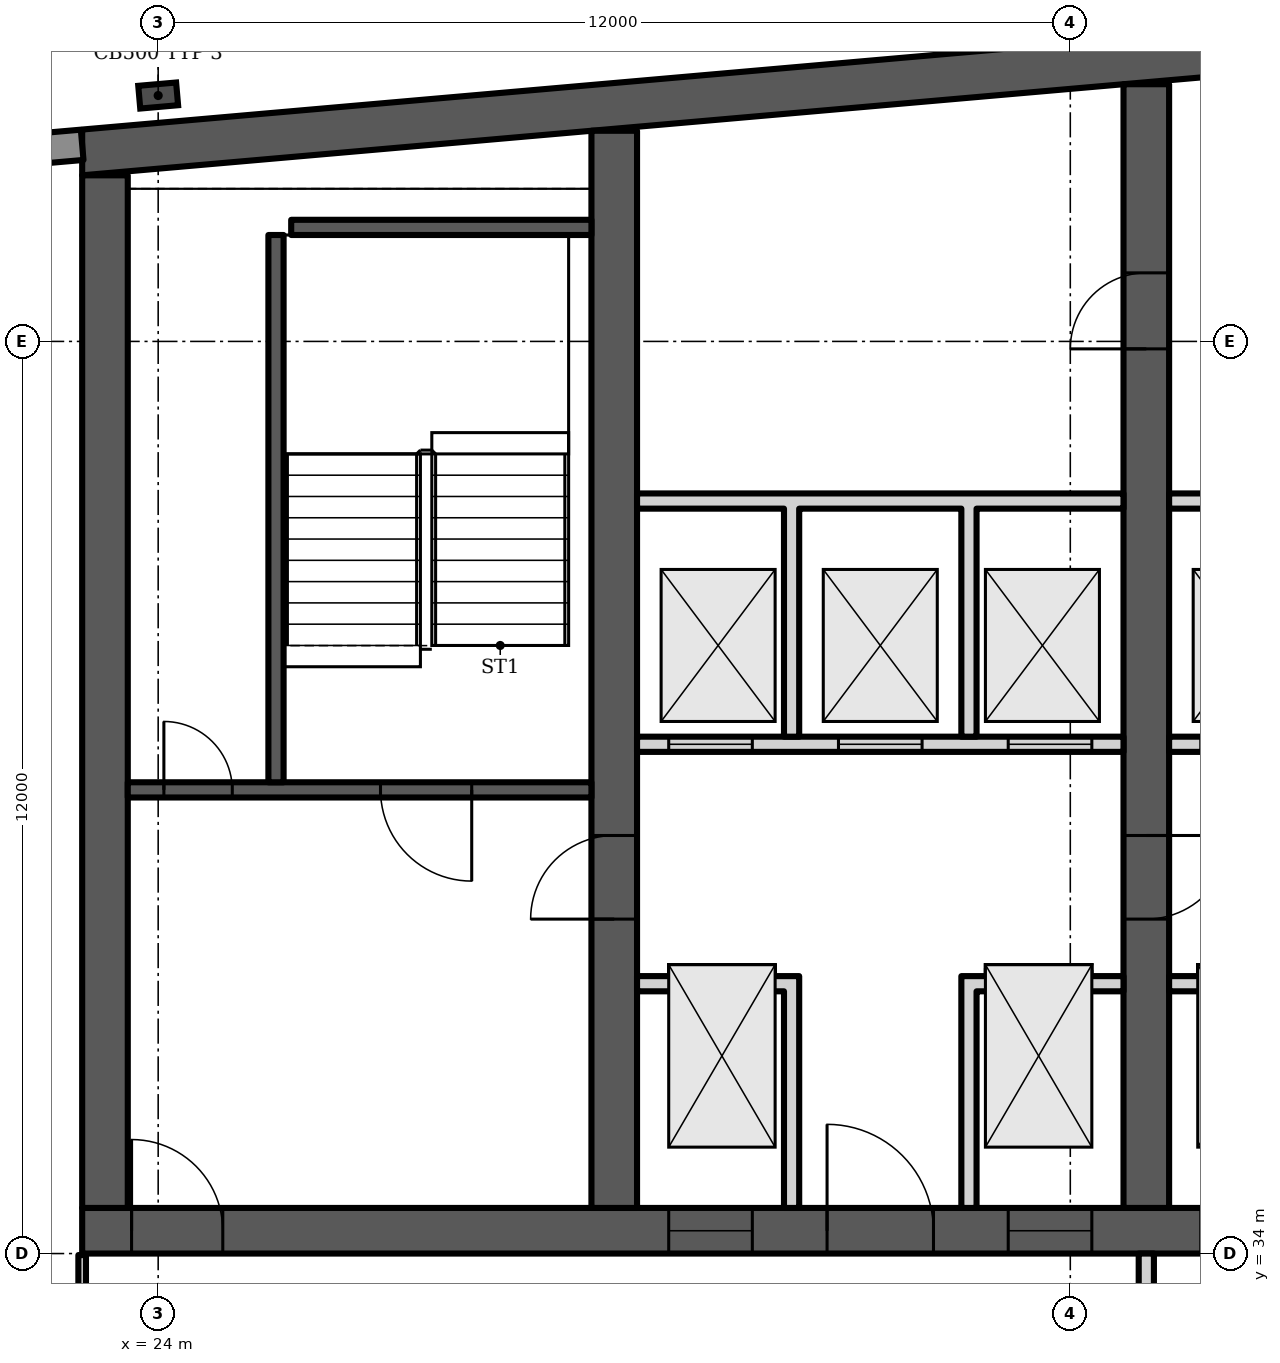
"""IFC4 building model, lengths in metres.
Left out: names, types, materials, properties, quantities, classifications, styles, units other than length and angle.
Written with IfcOpenShell. Run it as: python <this file> out.ifc"""

import sys

from ifc_helpers import new_model, si_unit, direction, frame, frame_2d, origin, origin_2d, place, context, subcontext, project, spatial, polyline, rectangle, i_section, outline, extrude, element, fill, save


model = new_model("IFC4")
c1 = context("Model", 3, precision=1e-05, world=origin(), true_north=direction((0.0, 1.0)))
c2 = subcontext(c1, "Body", "Model", "MODEL_VIEW")
j1 = project(units=[si_unit("LENGTHUNIT", "METRE"), si_unit("PLANEANGLEUNIT", "RADIAN")], contexts=[c1])
p1 = place(None, origin())
s1 = spatial("IfcSite", under=j1, at=p1, CompositionType="ELEMENT")
p2 = place(p1, origin())
s2 = spatial("IfcBuilding", under=s1, at=p2, CompositionType="ELEMENT")
p3 = place(p2, frame((0.0, 0.0, 232.3)))
s3 = spatial("IfcBuildingStorey", under=s2, at=p3, CompositionType="ELEMENT", Elevation=232.3)
p4 = place(p3, frame((0.0, 0.0, -0.0)))
e1 = element("IfcWall", 1, at=p4, inside=s3, PredefinedType="SHEAR", context=c2, shape_type="SweptSolid", body=[
    extrude(outline(polyline([(23.0, 48.185), (40.5, 49.716), (58.0, 48.185), (58.0, 48.787), (40.5, 50.318), (23.0, 48.787), (23.0, 48.185)])), origin(), (0.0, 0.0, 1.0), 3.6),
])
p5 = place(p3, frame((23.0, 34.3, 0.0), z_axis=(0.0, 0.0, 1.0), x_axis=(1.0, 0.0, 0.0)))
e2 = element("IfcWall", 2, at=p5, inside=s3, PredefinedType="SHEAR", context=c2, shape_type="SweptSolid", body=[
    extrude(rectangle(XDim=35.0, YDim=0.6, at=frame_2d((17.5, 0.0))), origin(), (0.0, 0.0, 1.0), 3.6),
])
p6 = place(p5, frame((0.65, 0.0, 0.0)))
e3 = element("IfcOpeningElement", 3, at=p6, cuts=e2, PredefinedType="OPENING", context=c2, shape_type="SweptSolid", body=[
    extrude(rectangle(XDim=1.2, YDim=2.1, at=frame_2d((0.6, 1.05))), frame((0.0, 0.31, 0.0), z_axis=(0.0, -1.0, 0.0), x_axis=(1.0, 0.0, 0.0)), (0.0, 0.0, 1.0), 0.62),
])
p7 = place(p5, frame((7.717, 0.0, 0.0)))
e4 = element("IfcOpeningElement", 4, at=p7, cuts=e2, PredefinedType="OPENING", context=c2, shape_type="SweptSolid", body=[
    extrude(rectangle(XDim=1.1, YDim=2.1, at=frame_2d((0.55, 1.05))), frame((0.0, 0.31, 0.0), z_axis=(0.0, -1.0, 0.0), x_axis=(1.0, 0.0, 0.0)), (0.0, 0.0, 1.0), 0.62),
])
p8 = place(p5, frame((12.183, 0.0, 0.0)))
e5 = element("IfcOpeningElement", 5, at=p8, cuts=e2, PredefinedType="OPENING", context=c2, shape_type="SweptSolid", body=[
    extrude(rectangle(XDim=1.1, YDim=2.1, at=frame_2d((0.55, 1.05))), frame((0.0, 0.31, 0.0), z_axis=(0.0, -1.0, 0.0), x_axis=(1.0, 0.0, 0.0)), (0.0, 0.0, 1.0), 0.62),
])
p9 = place(p5, frame((9.8, 0.0, 0.0)))
e6 = element("IfcOpeningElement", 6, at=p9, cuts=e2, PredefinedType="OPENING", context=c2, shape_type="SweptSolid", body=[
    extrude(rectangle(XDim=1.4, YDim=2.1, at=frame_2d((0.7, 1.05))), frame((0.0, 0.31, 0.0), z_axis=(0.0, -1.0, 0.0), x_axis=(1.0, 0.0, 0.0)), (0.0, 0.0, 1.0), 0.62),
])
p10 = place(p5, frame((14.717, 0.0, 0.0)))
e7 = element("IfcOpeningElement", 7, at=p10, cuts=e2, PredefinedType="OPENING", context=c2, shape_type="SweptSolid", body=[
    extrude(rectangle(XDim=1.1, YDim=2.1, at=frame_2d((0.55, 1.05))), frame((0.0, 0.31, 0.0), z_axis=(0.0, -1.0, 0.0), x_axis=(1.0, 0.0, 0.0)), (0.0, 0.0, 1.0), 0.62),
])
p11 = place(p5, frame((16.95, 0.0, 0.0)))
e8 = element("IfcOpeningElement", 8, at=p11, cuts=e2, PredefinedType="OPENING", context=c2, shape_type="SweptSolid", body=[
    extrude(rectangle(XDim=1.1, YDim=2.1, at=frame_2d((0.55, 1.05))), frame((0.0, 0.31, 0.0), z_axis=(0.0, -1.0, 0.0), x_axis=(1.0, 0.0, 0.0)), (0.0, 0.0, 1.0), 0.62),
])
p12 = place(p5, frame((19.183, 0.0, 0.0)))
e9 = element("IfcOpeningElement", 9, at=p12, cuts=e2, PredefinedType="OPENING", context=c2, shape_type="SweptSolid", body=[
    extrude(rectangle(XDim=1.1, YDim=2.1, at=frame_2d((0.55, 1.05))), frame((0.0, 0.31, 0.0), z_axis=(0.0, -1.0, 0.0), x_axis=(1.0, 0.0, 0.0)), (0.0, 0.0, 1.0), 0.62),
])
p13 = place(p5, frame((26.15, 0.0, 0.0)))
e10 = element("IfcOpeningElement", 10, at=p13, cuts=e2, PredefinedType="OPENING", context=c2, shape_type="SweptSolid", body=[
    extrude(rectangle(XDim=1.2, YDim=2.1, at=frame_2d((0.6, 1.05))), frame((0.0, 0.31, 0.0), z_axis=(0.0, -1.0, 0.0), x_axis=(1.0, 0.0, 0.0)), (0.0, 0.0, 1.0), 0.62),
])
p14 = place(p5, frame((28.767, 0.0, 0.0)))
e11 = element("IfcOpeningElement", 11, at=p14, cuts=e2, PredefinedType="OPENING", context=c2, shape_type="SweptSolid", body=[
    extrude(rectangle(XDim=1.0, YDim=2.1, at=frame_2d((0.5, 1.05))), frame((0.0, 0.31, 0.0), z_axis=(0.0, -1.0, 0.0), x_axis=(1.0, 0.0, 0.0)), (0.0, 0.0, 1.0), 0.62),
])
p15 = place(p5, frame((33.083, 0.0, 0.0)))
e12 = element("IfcOpeningElement", 12, at=p15, cuts=e2, PredefinedType="OPENING", context=c2, shape_type="SweptSolid", body=[
    extrude(rectangle(XDim=1.0, YDim=2.1, at=frame_2d((0.5, 1.05))), frame((0.0, 0.31, 0.0), z_axis=(0.0, -1.0, 0.0), x_axis=(1.0, 0.0, 0.0)), (0.0, 0.0, 1.0), 0.62),
])
p16 = place(p5, frame((30.8, 0.0, 0.0)))
e13 = element("IfcOpeningElement", 13, at=p16, cuts=e2, PredefinedType="OPENING", context=c2, shape_type="SweptSolid", body=[
    extrude(rectangle(XDim=1.4, YDim=2.1, at=frame_2d((0.7, 1.05))), frame((0.0, 0.31, 0.0), z_axis=(0.0, -1.0, 0.0), x_axis=(1.0, 0.0, 0.0)), (0.0, 0.0, 1.0), 0.62),
])
p17 = place(p3, frame((23.3, 34.6, 0.0), z_axis=(0.0, 0.0, 1.0), x_axis=(0.0, 1.0, 0.0)))
e14 = element("IfcWall", 14, at=p17, inside=s3, PredefinedType="SHEAR", context=c2, shape_type="SweptSolid", body=[
    extrude(rectangle(XDim=13.585, YDim=0.6, at=frame_2d((6.792, 0.0))), origin(), (0.0, 0.0, 1.0), 3.6),
])
p18 = place(p3, frame((30.0, 34.6, 0.0), z_axis=(0.0, 0.0, 1.0), x_axis=(0.0, 1.0, 0.0)))
e15 = element("IfcWall", 15, at=p18, inside=s3, PredefinedType="SHEAR", context=c2, shape_type="SweptSolid", body=[
    extrude(rectangle(XDim=14.171, YDim=0.6, at=frame_2d((7.085, 0.0))), origin(), (0.0, 0.0, 1.0), 3.6),
])
p19 = place(p18, frame((3.8, 0.0, 0.0)))
e16 = element("IfcOpeningElement", 16, at=p19, cuts=e15, PredefinedType="OPENING", context=c2, shape_type="SweptSolid", body=[
    extrude(rectangle(XDim=1.1, YDim=2.1, at=frame_2d((0.55, 1.05))), frame((0.0, 0.31, 0.0), z_axis=(0.0, -1.0, 0.0), x_axis=(1.0, 0.0, 0.0)), (0.0, 0.0, 1.0), 0.62),
])
p20 = place(p3, frame((37.0, 34.6, 0.0), z_axis=(0.0, 0.0, 1.0), x_axis=(0.0, 1.0, 0.0)))
e17 = element("IfcWall", 17, at=p20, inside=s3, PredefinedType="SHEAR", context=c2, shape_type="SweptSolid", body=[
    extrude(rectangle(XDim=14.784, YDim=0.6, at=frame_2d((7.392, 0.0))), origin(), (0.0, 0.0, 1.0), 3.6),
])
p21 = place(p20, frame((11.302, 0.0, 0.0)))
e18 = element("IfcOpeningElement", 18, at=p21, cuts=e17, PredefinedType="OPENING", context=c2, shape_type="SweptSolid", body=[
    extrude(rectangle(XDim=1.0, YDim=2.1, at=frame_2d((0.5, 1.05))), frame((0.0, 0.31, 0.0), z_axis=(0.0, -1.0, 0.0), x_axis=(1.0, 0.0, 0.0)), (0.0, 0.0, 1.0), 0.62),
])
p22 = place(p20, frame((3.8, 0.0, 0.0)))
e19 = element("IfcOpeningElement", 19, at=p22, cuts=e17, PredefinedType="OPENING", context=c2, shape_type="SweptSolid", body=[
    extrude(rectangle(XDim=1.1, YDim=2.1, at=frame_2d((0.55, 1.05))), frame((0.0, 0.31, 0.0), z_axis=(0.0, -1.0, 0.0), x_axis=(1.0, 0.0, 0.0)), (0.0, 0.0, 1.0), 0.62),
])
p23 = place(p3, frame((24.0, 49.235, 0.0), z_axis=(0.0, 0.0, 1.0), x_axis=(-0.087156, 0.996197, 0.0)))
e20 = element("IfcColumn", 20, at=p23, inside=s3, PredefinedType="COLUMN", context=c2, shape_type="SweptSolid", body=[
    extrude(i_section(OverallWidth=0.3, OverallDepth=0.5, WebThickness=0.014, FlangeThickness=0.028, FilletRadius=0.027, at=origin_2d()), origin(), (0.0, 0.0, 1.0), 3.6),
])
p24 = place(p3, frame((23.0, 48.587, 0.0), z_axis=(0.0, 0.0, 1.0), x_axis=(-0.996194, -0.087168, 0.0)))
e21 = element("IfcWall", 21, at=p24, inside=s3, PredefinedType="SOLIDWALL", context=c2, shape_type="SweptSolid", body=[
    extrude(rectangle(XDim=2.994, YDim=0.4, at=frame_2d((1.497, 0.0))), origin(), (0.0, 0.0, 1.0), 3.2),
])
p25 = place(p3, frame((23.6, 40.1, 0.0), z_axis=(0.0, 0.0, 1.0), x_axis=(1.0, 0.0, 0.0)))
e22 = element("IfcWall", 22, at=p25, inside=s3, PredefinedType="SHEAR", context=c2, shape_type="SweptSolid", body=[
    extrude(rectangle(XDim=6.1, YDim=0.2, at=frame_2d((3.05, 0.0))), origin(), (0.0, 0.0, 1.0), 3.2),
])
p26 = place(p25, frame((3.325, 0.0, 0.0)))
e23 = element("IfcOpeningElement", 23, at=p26, cuts=e22, PredefinedType="OPENING", context=c2, shape_type="SweptSolid", body=[
    extrude(rectangle(XDim=1.2, YDim=2.1, at=frame_2d((0.6, 1.05))), frame((0.0, 0.11, 0.0), z_axis=(0.0, -1.0, 0.0), x_axis=(1.0, 0.0, 0.0)), (0.0, 0.0, 1.0), 0.22),
])
p27 = place(p25, frame((0.475, 0.0, 0.0)))
e24 = element("IfcOpeningElement", 24, at=p27, cuts=e22, PredefinedType="OPENING", context=c2, shape_type="SweptSolid", body=[
    extrude(rectangle(XDim=0.9, YDim=2.1, at=frame_2d((0.45, 1.05))), frame((0.0, 0.11, 0.0), z_axis=(0.0, -1.0, 0.0), x_axis=(1.0, 0.0, 0.0)), (0.0, 0.0, 1.0), 0.22),
])
p28 = place(p3, frame((25.55, 40.2, 0.0), z_axis=(0.0, 0.0, 1.0), x_axis=(0.0, 1.0, 0.0)))
e25 = element("IfcWall", 25, at=p28, inside=s3, PredefinedType="SHEAR", context=c2, shape_type="SweptSolid", body=[
    extrude(rectangle(XDim=7.2, YDim=0.2, at=frame_2d((3.6, 0.0))), origin(), (0.0, 0.0, 1.0), 3.2),
])
p29 = place(p3, frame((25.75, 47.5, 0.0), z_axis=(0.0, 0.0, 1.0), x_axis=(1.0, 0.0, 0.0)))
e26 = element("IfcWall", 26, at=p29, inside=s3, PredefinedType="SHEAR", context=c2, shape_type="SweptSolid", body=[
    extrude(rectangle(XDim=3.95, YDim=0.2, at=frame_2d((1.975, 0.0))), origin(), (0.0, 0.0, 1.0), 3.2),
])
p30 = place(p3, frame((30.3, 40.7, 0.0), z_axis=(0.0, 0.0, 1.0), x_axis=(1.0, 0.0, 0.0)))
e27 = element("IfcWall", 27, at=p30, inside=s3, PredefinedType="PARTITIONING", context=c2, shape_type="SweptSolid", body=[
    extrude(rectangle(XDim=6.4, YDim=0.2, at=frame_2d((3.2, 0.0))), origin(), (0.0, 0.0, 1.0), 3.2),
])
p31 = place(p30, frame((0.417, 0.0, 0.0)))
e28 = element("IfcOpeningElement", 28, at=p31, cuts=e27, PredefinedType="OPENING", context=c2, shape_type="SweptSolid", body=[
    extrude(rectangle(XDim=1.1, YDim=2.1, at=frame_2d((0.55, 1.05))), frame((0.0, 0.11, 0.0), z_axis=(0.0, -1.0, 0.0), x_axis=(1.0, 0.0, 0.0)), (0.0, 0.0, 1.0), 0.22),
])
p32 = place(p30, frame((2.65, 0.0, 0.0)))
e29 = element("IfcOpeningElement", 29, at=p32, cuts=e27, PredefinedType="OPENING", context=c2, shape_type="SweptSolid", body=[
    extrude(rectangle(XDim=1.1, YDim=2.1, at=frame_2d((0.55, 1.05))), frame((0.0, 0.11, 0.0), z_axis=(0.0, -1.0, 0.0), x_axis=(1.0, 0.0, 0.0)), (0.0, 0.0, 1.0), 0.22),
])
p33 = place(p30, frame((4.883, 0.0, 0.0)))
e30 = element("IfcOpeningElement", 30, at=p33, cuts=e27, PredefinedType="OPENING", context=c2, shape_type="SweptSolid", body=[
    extrude(rectangle(XDim=1.1, YDim=2.1, at=frame_2d((0.55, 1.05))), frame((0.0, 0.11, 0.0), z_axis=(0.0, -1.0, 0.0), x_axis=(1.0, 0.0, 0.0)), (0.0, 0.0, 1.0), 0.22),
])
p34 = place(p3, frame((0.0, 0.0, -0.0)))
e31 = element("IfcWall", 31, at=p34, inside=s3, PredefinedType="PARTITIONING", context=c2, shape_type="SweptSolid", body=[
    extrude(outline(polyline([(32.233, 37.45), (30.3, 37.45), (30.3, 37.65), (32.233, 37.65), (32.433, 37.65), (32.433, 34.6), (32.233, 34.6), (32.233, 37.45)])), origin(), (0.0, 0.0, 1.0), 3.2),
])
p35 = place(p3, frame((0.0, 0.0, -0.0)))
e32 = element("IfcWall", 32, at=p35, inside=s3, PredefinedType="PARTITIONING", context=c2, shape_type="SweptSolid", body=[
    extrude(outline(polyline([(34.567, 37.65), (34.767, 37.65), (36.7, 37.65), (36.7, 37.45), (34.767, 37.45), (34.767, 34.6), (34.567, 34.6), (34.567, 37.65)])), origin(), (0.0, 0.0, 1.0), 3.2),
])
p36 = place(p3, frame((0.0, 0.0, -0.0)))
e33 = element("IfcWall", 33, at=p36, inside=s3, PredefinedType="PARTITIONING", context=c2, shape_type="SweptSolid", body=[
    extrude(outline(polyline([(32.433, 40.8), (32.233, 40.8), (32.233, 43.8), (30.3, 43.8), (30.3, 44.0), (36.7, 44.0), (36.7, 43.8), (34.767, 43.8), (34.767, 40.8), (34.567, 40.8), (34.567, 43.8), (32.433, 43.8), (32.433, 40.8)])), origin(), (0.0, 0.0, 1.0), 3.2),
])
p37 = place(p3, frame((37.3, 40.7, 0.0), z_axis=(0.0, 0.0, 1.0), x_axis=(1.0, 0.0, 0.0)))
e34 = element("IfcWall", 34, at=p37, inside=s3, PredefinedType="PARTITIONING", context=c2, shape_type="SweptSolid", body=[
    extrude(rectangle(XDim=6.4, YDim=0.2, at=frame_2d((3.2, 0.0))), origin(), (0.0, 0.0, 1.0), 3.2),
])
p38 = place(p37, frame((0.417, 0.0, 0.0)))
e35 = element("IfcOpeningElement", 35, at=p38, cuts=e34, PredefinedType="OPENING", context=c2, shape_type="SweptSolid", body=[
    extrude(rectangle(XDim=1.1, YDim=2.1, at=frame_2d((0.55, 1.05))), frame((0.0, 0.11, 0.0), z_axis=(0.0, -1.0, 0.0), x_axis=(1.0, 0.0, 0.0)), (0.0, 0.0, 1.0), 0.22),
])
p39 = place(p37, frame((2.65, 0.0, 0.0)))
e36 = element("IfcOpeningElement", 36, at=p39, cuts=e34, PredefinedType="OPENING", context=c2, shape_type="SweptSolid", body=[
    extrude(rectangle(XDim=1.1, YDim=2.1, at=frame_2d((0.55, 1.05))), frame((0.0, 0.11, 0.0), z_axis=(0.0, -1.0, 0.0), x_axis=(1.0, 0.0, 0.0)), (0.0, 0.0, 1.0), 0.22),
])
p40 = place(p37, frame((4.883, 0.0, 0.0)))
e37 = element("IfcOpeningElement", 37, at=p40, cuts=e34, PredefinedType="OPENING", context=c2, shape_type="SweptSolid", body=[
    extrude(rectangle(XDim=1.1, YDim=2.1, at=frame_2d((0.55, 1.05))), frame((0.0, 0.11, 0.0), z_axis=(0.0, -1.0, 0.0), x_axis=(1.0, 0.0, 0.0)), (0.0, 0.0, 1.0), 0.22),
])
p41 = place(p3, frame((0.0, 0.0, -0.0)))
e38 = element("IfcWall", 38, at=p41, inside=s3, PredefinedType="PARTITIONING", context=c2, shape_type="SweptSolid", body=[
    extrude(outline(polyline([(41.567, 37.1), (39.433, 37.1), (39.433, 34.6), (39.233, 34.6), (39.233, 37.45), (37.3, 37.45), (37.3, 37.65), (39.233, 37.65), (39.433, 37.65), (39.433, 37.3), (41.567, 37.3), (41.567, 37.35), (41.767, 37.35), (43.7, 37.35), (43.7, 37.15), (41.767, 37.15), (41.767, 34.6), (41.567, 34.6), (41.567, 37.1)])), origin(), (0.0, 0.0, 1.0), 3.2),
])
p42 = place(p3, frame((0.0, 0.0, -0.0)))
e39 = element("IfcWall", 39, at=p42, inside=s3, PredefinedType="PARTITIONING", context=c2, shape_type="SweptSolid", body=[
    extrude(outline(polyline([(39.433, 40.8), (39.233, 40.8), (39.233, 43.8), (37.3, 43.8), (37.3, 44.0), (43.7, 44.0), (43.7, 43.8), (41.767, 43.8), (41.767, 40.8), (41.567, 40.8), (41.567, 43.8), (39.433, 43.8), (39.433, 40.8)])), origin(), (0.0, 0.0, 1.0), 3.2),
])
p43 = place(p3, frame((37.0, 30.5, 0.0), z_axis=(0.0, 0.0, 1.0), x_axis=(0.0, 1.0, 0.0)))
e40 = element("IfcWall", 40, at=p43, inside=s3, PredefinedType="PARTITIONING", context=c2, shape_type="SweptSolid", body=[
    extrude(rectangle(XDim=3.5, YDim=0.2, at=frame_2d((1.75, 0.0))), origin(), (0.0, 0.0, 1.0), 3.2),
])
p44 = place(p43, frame((1.2, 0.0, 0.0)))
e41 = element("IfcOpeningElement", 41, at=p44, cuts=e40, PredefinedType="OPENING", context=c2, shape_type="SweptSolid", body=[
    extrude(rectangle(XDim=1.1, YDim=2.1, at=frame_2d((0.55, 1.05))), frame((0.0, 0.11, 0.0), z_axis=(0.0, -1.0, 0.0), x_axis=(1.0, 0.0, 0.0)), (0.0, 0.0, 1.0), 0.22),
])
p45 = place(p3, frame((23.0, 24.275, 0.0), z_axis=(0.0, 0.0, 1.0), x_axis=(0.0, 1.0, 0.0)))
e42 = element("IfcWall", 42, at=p45, inside=s3, PredefinedType="PARTITIONING", context=c2, shape_type="SweptSolid", body=[
    extrude(rectangle(XDim=9.705, YDim=0.1, at=frame_2d((4.853, 0.0))), origin(), (0.0, 0.0, 1.0), 3.2),
])
p46 = place(p45, frame((7.905, 0.0, 0.0)))
e43 = element("IfcOpeningElement", 43, at=p46, cuts=e42, PredefinedType="OPENING", context=c2, shape_type="SweptSolid", body=[
    extrude(rectangle(XDim=1.0, YDim=2.1, at=frame_2d((0.5, 1.05))), frame((0.0, 0.06, 0.0), z_axis=(0.0, -1.0, 0.0), x_axis=(1.0, 0.0, 0.0)), (0.0, 0.0, 1.0), 0.12),
])
p47 = place(p26, origin())
e44 = element("IfcDoor", 44, at=p47, inside=s3, OperationType="SINGLE_SWING_RIGHT", PredefinedType="DOOR", context=c2, shape_type="SweptSolid", body=[
    extrude(rectangle(XDim=1.2, YDim=2.1, at=frame_2d((0.6, 1.05))), frame((0.0, 0.025, 0.0), z_axis=(0.0, -1.0, 0.0), x_axis=(1.0, 0.0, 0.0)), (0.0, 0.0, 1.0), 0.05),
])
fill(e23, e44)
p48 = place(p27, origin())
e45 = element("IfcDoor", 45, at=p48, inside=s3, OperationType="SINGLE_SWING_LEFT", PredefinedType="DOOR", context=c2, shape_type="SweptSolid", body=[
    extrude(rectangle(XDim=0.9, YDim=2.1, at=frame_2d((0.45, 1.05))), frame((0.0, 0.025, 0.0), z_axis=(0.0, -1.0, 0.0), x_axis=(1.0, 0.0, 0.0)), (0.0, 0.0, 1.0), 0.05),
])
fill(e24, e45)
p49 = place(p6, origin())
e46 = element("IfcDoor", 46, at=p49, inside=s3, OperationType="SINGLE_SWING_LEFT", PredefinedType="DOOR", context=c2, shape_type="SweptSolid", body=[
    extrude(rectangle(XDim=1.2, YDim=2.1, at=frame_2d((0.6, 1.05))), frame((0.0, 0.025, 0.0), z_axis=(0.0, -1.0, 0.0), x_axis=(1.0, 0.0, 0.0)), (0.0, 0.0, 1.0), 0.05),
])
fill(e3, e46)
p50 = place(p7, origin())
e47 = element("IfcDoor", 47, at=p50, inside=s3, OperationType="DOUBLE_DOOR_SLIDING", PredefinedType="DOOR", context=c2, shape_type="SweptSolid", body=[
    extrude(rectangle(XDim=1.1, YDim=2.1, at=frame_2d((0.55, 1.05))), frame((0.0, 0.025, 0.0), z_axis=(0.0, -1.0, 0.0), x_axis=(1.0, 0.0, 0.0)), (0.0, 0.0, 1.0), 0.05),
])
fill(e4, e47)
p51 = place(p8, origin())
e48 = element("IfcDoor", 48, at=p51, inside=s3, OperationType="DOUBLE_DOOR_SLIDING", PredefinedType="DOOR", context=c2, shape_type="SweptSolid", body=[
    extrude(rectangle(XDim=1.1, YDim=2.1, at=frame_2d((0.55, 1.05))), frame((0.0, 0.025, 0.0), z_axis=(0.0, -1.0, 0.0), x_axis=(1.0, 0.0, 0.0)), (0.0, 0.0, 1.0), 0.05),
])
fill(e5, e48)
p52 = place(p9, origin())
e49 = element("IfcDoor", 49, at=p52, inside=s3, OperationType="DOUBLE_DOOR_SINGLE_SWING", PredefinedType="DOOR", context=c2, shape_type="SweptSolid", body=[
    extrude(rectangle(XDim=1.4, YDim=2.1, at=frame_2d((0.7, 1.05))), frame((0.0, 0.025, 0.0), z_axis=(0.0, -1.0, 0.0), x_axis=(1.0, 0.0, 0.0)), (0.0, 0.0, 1.0), 0.05),
])
fill(e6, e49)
p53 = place(p31, origin())
e50 = element("IfcDoor", 50, at=p53, inside=s3, OperationType="DOUBLE_DOOR_SLIDING", PredefinedType="DOOR", context=c2, shape_type="SweptSolid", body=[
    extrude(rectangle(XDim=1.1, YDim=2.1, at=frame_2d((0.55, 1.05))), frame((0.0, 0.025, 0.0), z_axis=(0.0, -1.0, 0.0), x_axis=(1.0, 0.0, 0.0)), (0.0, 0.0, 1.0), 0.05),
])
fill(e28, e50)
p54 = place(p32, origin())
e51 = element("IfcDoor", 51, at=p54, inside=s3, OperationType="DOUBLE_DOOR_SLIDING", PredefinedType="DOOR", context=c2, shape_type="SweptSolid", body=[
    extrude(rectangle(XDim=1.1, YDim=2.1, at=frame_2d((0.55, 1.05))), frame((0.0, 0.025, 0.0), z_axis=(0.0, -1.0, 0.0), x_axis=(1.0, 0.0, 0.0)), (0.0, 0.0, 1.0), 0.05),
])
fill(e29, e51)
p55 = place(p33, origin())
e52 = element("IfcDoor", 52, at=p55, inside=s3, OperationType="DOUBLE_DOOR_SLIDING", PredefinedType="DOOR", context=c2, shape_type="SweptSolid", body=[
    extrude(rectangle(XDim=1.1, YDim=2.1, at=frame_2d((0.55, 1.05))), frame((0.0, 0.025, 0.0), z_axis=(0.0, -1.0, 0.0), x_axis=(1.0, 0.0, 0.0)), (0.0, 0.0, 1.0), 0.05),
])
fill(e30, e52)
p56 = place(p21, origin())
e53 = element("IfcDoor", 53, at=p56, inside=s3, OperationType="SINGLE_SWING_LEFT", PredefinedType="DOOR", context=c2, shape_type="SweptSolid", body=[
    extrude(rectangle(XDim=1.0, YDim=2.1, at=frame_2d((0.5, 1.05))), frame((0.0, 0.025, 0.0), z_axis=(0.0, -1.0, 0.0), x_axis=(1.0, 0.0, 0.0)), (0.0, 0.0, 1.0), 0.05),
])
fill(e18, e53)
p57 = place(p19, origin())
e54 = element("IfcDoor", 54, at=p57, inside=s3, OperationType="SINGLE_SWING_LEFT", PredefinedType="DOOR", context=c2, shape_type="SweptSolid", body=[
    extrude(rectangle(XDim=1.1, YDim=2.1, at=frame_2d((0.55, 1.05))), frame((0.0, 0.025, 0.0), z_axis=(0.0, -1.0, 0.0), x_axis=(1.0, 0.0, 0.0)), (0.0, 0.0, 1.0), 0.05),
])
fill(e16, e54)
p58 = place(p22, origin())
e55 = element("IfcDoor", 55, at=p58, inside=s3, OperationType="SINGLE_SWING_RIGHT", PredefinedType="DOOR", context=c2, shape_type="SweptSolid", body=[
    extrude(rectangle(XDim=1.1, YDim=2.1, at=frame_2d((0.55, 1.05))), frame((0.0, 0.025, 0.0), z_axis=(0.0, -1.0, 0.0), x_axis=(1.0, 0.0, 0.0)), (0.0, 0.0, 1.0), 0.05),
])
fill(e19, e55)
save(model, sys.argv[1])
